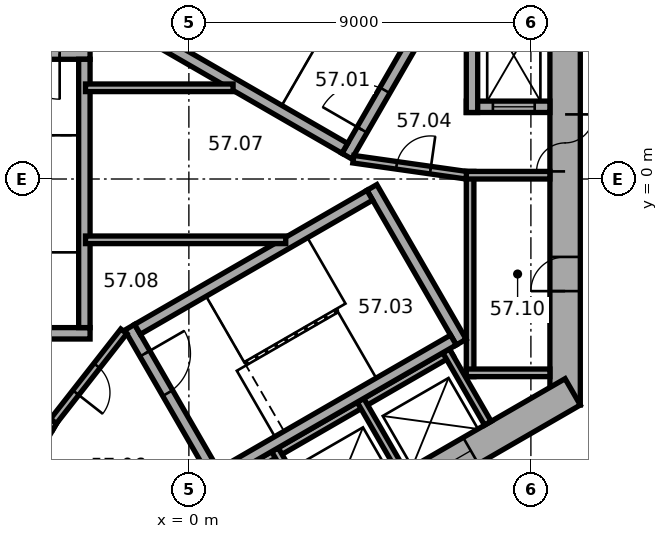
"""IFC4 building model, lengths in metres.
Left out: names, types, materials, properties, quantities, classifications, styles, units other than length and angle.
Written with IfcOpenShell. Run it as: python <this file> out.ifc"""

import sys

from ifc_helpers import new_model, si_unit, direction, frame, frame_2d, origin, place, context, subcontext, project, spatial, rectangle, extrude, element, fill, save


model = new_model("IFC4")
c1 = context("Model", 3, precision=1e-05, world=origin(), true_north=direction((0.0, 1.0)))
c2 = subcontext(c1, "Body", "Model", "MODEL_VIEW")
j1 = project(units=[si_unit("LENGTHUNIT", "METRE"), si_unit("PLANEANGLEUNIT", "RADIAN")], contexts=[c1])
p1 = place(None, origin())
s1 = spatial("IfcSite", under=j1, at=p1, CompositionType="ELEMENT")
p2 = place(p1, origin())
s2 = spatial("IfcBuilding", under=s1, at=p2, CompositionType="ELEMENT")
p3 = place(p2, frame((0.0, 0.0, 232.8)))
s3 = spatial("IfcBuildingStorey", under=s2, at=p3, CompositionType="ELEMENT", Elevation=232.8)
p4 = place(p3, frame((9.9, -5.947, 0.0), z_axis=(0.0, 0.0, 1.0), x_axis=(0.0, 1.0, 0.0)))
e1 = element("IfcWall", 1, at=p4, inside=s3, PredefinedType="SHEAR", context=c2, shape_type="SweptSolid", body=[
    extrude(rectangle(XDim=11.894, YDim=0.8, at=frame_2d((5.947, 0.0))), origin(), (0.0, 0.0, 1.0), 3.7),
])
p5 = place(p4, frame((6.147, 0.0, 0.0)))
e2 = element("IfcOpeningElement", 2, at=p5, cuts=e1, PredefinedType="OPENING", context=c2, shape_type="SweptSolid", body=[
    extrude(rectangle(XDim=1.5, YDim=2.1, at=frame_2d((0.75, 1.05))), frame((0.0, 0.41, 0.0), z_axis=(0.0, -1.0, 0.0), x_axis=(1.0, 0.0, 0.0)), (0.0, 0.0, 1.0), 0.82),
])
p6 = place(p4, frame((2.997, 0.0, 0.0)))
e3 = element("IfcOpeningElement", 3, at=p6, cuts=e1, PredefinedType="OPENING", context=c2, shape_type="SweptSolid", body=[
    extrude(rectangle(XDim=0.9, YDim=2.1, at=frame_2d((0.45, 1.05))), frame((0.0, 0.41, 0.0), z_axis=(0.0, -1.0, 0.0), x_axis=(1.0, 0.0, 0.0)), (0.0, 0.0, 1.0), 0.82),
])
p7 = place(p3, frame((-10.1, -5.6, 0.0), z_axis=(0.0, 0.0, 1.0), x_axis=(0.866023897231, -0.500002609418, 0.0)))
e4 = element("IfcWall", 4, at=p7, inside=s3, PredefinedType="SHEAR", context=c2, shape_type="SweptSolid", body=[
    extrude(rectangle(XDim=11.894, YDim=0.8, at=frame_2d((5.947, 0.0))), origin(), (0.0, 0.0, 1.0), 3.7),
])
p8 = place(p7, frame((6.147, 0.0, 0.0)))
e5 = element("IfcOpeningElement", 5, at=p8, cuts=e4, PredefinedType="OPENING", context=c2, shape_type="SweptSolid", body=[
    extrude(rectangle(XDim=1.5, YDim=2.1, at=frame_2d((0.75, 1.05))), frame((0.0, 0.41, 0.0), z_axis=(0.0, -1.0, 0.0), x_axis=(1.0, 0.0, 0.0)), (0.0, 0.0, 1.0), 0.82),
])
p9 = place(p7, frame((1.597, 0.0, 0.0)))
e6 = element("IfcOpeningElement", 6, at=p9, cuts=e4, PredefinedType="OPENING", context=c2, shape_type="SweptSolid", body=[
    extrude(rectangle(XDim=1.1, YDim=2.1, at=frame_2d((0.55, 1.05))), frame((0.0, 0.41, 0.0), z_axis=(0.0, -1.0, 0.0), x_axis=(1.0, 0.0, 0.0)), (0.0, 0.0, 1.0), 0.82),
])
p10 = place(p7, frame((4.197, 0.0, 0.0)))
e7 = element("IfcOpeningElement", 7, at=p10, cuts=e4, PredefinedType="OPENING", context=c2, shape_type="SweptSolid", body=[
    extrude(rectangle(XDim=1.1, YDim=2.1, at=frame_2d((0.55, 1.05))), frame((0.0, 0.41, 0.0), z_axis=(0.0, -1.0, 0.0), x_axis=(1.0, 0.0, 0.0)), (0.0, 0.0, 1.0), 0.82),
])
p11 = place(p3, frame((-0.2, -11.547, 0.0), z_axis=(0.0, 0.0, 1.0), x_axis=(0.866023897231, 0.500002609418, 0.0)))
e8 = element("IfcWall", 8, at=p11, inside=s3, PredefinedType="SHEAR", context=c2, shape_type="SweptSolid", body=[
    extrude(rectangle(XDim=11.894, YDim=0.8, at=frame_2d((5.947, 0.0))), origin(), (0.0, 0.0, 1.0), 3.7),
])
p12 = place(p11, frame((2.497, 0.0, 0.0)))
e9 = element("IfcOpeningElement", 9, at=p12, cuts=e8, PredefinedType="OPENING", context=c2, shape_type="SweptSolid", body=[
    extrude(rectangle(XDim=1.1, YDim=2.1, at=frame_2d((0.55, 1.05))), frame((0.0, 0.41, 0.0), z_axis=(0.0, -1.0, 0.0), x_axis=(1.0, 0.0, 0.0)), (0.0, 0.0, 1.0), 0.82),
])
p13 = place(p11, frame((5.097, 0.0, 0.0)))
e10 = element("IfcOpeningElement", 10, at=p13, cuts=e8, PredefinedType="OPENING", context=c2, shape_type="SweptSolid", body=[
    extrude(rectangle(XDim=1.1, YDim=2.1, at=frame_2d((0.55, 1.05))), frame((0.0, 0.41, 0.0), z_axis=(0.0, -1.0, 0.0), x_axis=(1.0, 0.0, 0.0)), (0.0, 0.0, 1.0), 0.82),
])
p14 = place(p11, frame((7.697, 0.0, 0.0)))
e11 = element("IfcOpeningElement", 11, at=p14, cuts=e8, PredefinedType="OPENING", context=c2, shape_type="SweptSolid", body=[
    extrude(rectangle(XDim=1.1, YDim=2.1, at=frame_2d((0.55, 1.05))), frame((0.0, 0.41, 0.0), z_axis=(0.0, -1.0, 0.0), x_axis=(1.0, 0.0, 0.0)), (0.0, 0.0, 1.0), 0.82),
])
p15 = place(p3, frame((7.4, -5.2, 0.0), z_axis=(0.0, 0.0, 1.0), x_axis=(0.0, 1.0, 0.0)))
e12 = element("IfcWall", 12, at=p15, inside=s3, PredefinedType="PARTITIONING", context=c2, shape_type="SweptSolid", body=[
    extrude(rectangle(XDim=5.4, YDim=0.2, at=frame_2d((2.7, 0.0))), origin(), (0.0, 0.0, 1.0), 3.42),
])
for number, where, z_axis, x_axis in (
    (13, (7.3, -5.1, 0.0), (0.0, 0.0, 1.0), (1.0, 0.0, 0.0)),
    (14, (7.3, 0.1, 0.0), (0.0, 0.0, 1.0), (1.0, 0.0, 0.0)),
):
    element("IfcWall", number, at=place(p3, frame(where, z_axis=z_axis, x_axis=x_axis)), inside=s3, PredefinedType="PARTITIONING", context=c2, shape_type="SweptSolid", body=[
        extrude(rectangle(XDim=2.2, YDim=0.2, at=frame_2d((1.1, 0.0))), origin(), (0.0, 0.0, 1.0), 3.42),
    ])
p16 = place(p3, frame((-8.203, -3.809, 0.0), z_axis=(0.0, 0.0, 1.0), x_axis=(0.866028230842, -0.499995103361, 0.0)))
e15 = element("IfcWall", 15, at=p16, inside=s3, PredefinedType="PARTITIONING", context=c2, shape_type="SweptSolid", body=[
    extrude(rectangle(XDim=5.4, YDim=0.2, at=frame_2d((2.7, 0.0))), origin(), (0.0, 0.0, 1.0), 3.42),
])
p17 = place(p3, frame((-3.563, -6.372, 0.0), z_axis=(0.0, 0.0, 1.0), x_axis=(-0.499994660107, -0.866028486751, 0.0)))
e16 = element("IfcWall", 16, at=p17, inside=s3, PredefinedType="PARTITIONING", context=c2, shape_type="SweptSolid", body=[
    extrude(rectangle(XDim=2.2, YDim=0.2, at=frame_2d((1.1, 0.0))), origin(), (0.0, 0.0, 1.0), 3.42),
])
p18 = place(p3, frame((-0.024, -8.559, 0.0), z_axis=(0.0, 0.0, 1.0), x_axis=(0.866026010844, 0.49999894854, 0.0)))
e17 = element("IfcWall", 17, at=p18, inside=s3, PredefinedType="PARTITIONING", context=c2, shape_type="SweptSolid", body=[
    extrude(rectangle(XDim=8.0, YDim=0.2, at=frame_2d((4.0, 0.0))), origin(), (0.0, 0.0, 1.0), 3.42),
])
for number, where, z_axis, x_axis in (
    (18, (2.264, -7.122, 0.0), (0.0, 0.0, 1.0), (0.5, -0.866, 0.0)),
    (19, (4.516, -5.822, 0.0), (0.0, 0.0, 1.0), (0.5, -0.866, 0.0)),
    (20, (6.768, -4.522, 0.0), (0.0, 0.0, 1.0), (0.5, -0.866, 0.0)),
):
    element("IfcWall", number, at=place(p3, frame(where, z_axis=z_axis, x_axis=x_axis)), inside=s3, PredefinedType="PARTITIONING", context=c2, shape_type="SweptSolid", body=[
        extrude(rectangle(XDim=2.2, YDim=0.2, at=frame_2d((1.1, 0.0))), origin(), (0.0, 0.0, 1.0), 3.42),
    ])
p19 = place(p3, frame((4.158, 0.602, 0.0), z_axis=(0.0, 0.0, 1.0), x_axis=(0.499977259774, 0.866038532462, 0.0)))
e21 = element("IfcWall", 21, at=p19, inside=s3, PredefinedType="SHEAR", context=c2, shape_type="SweptSolid", body=[
    extrude(rectangle(XDim=4.7, YDim=0.3, at=frame_2d((2.35, 0.0))), origin(), (0.0, 0.0, 1.0), 3.42),
])
p20 = place(p19, frame((0.8, 0.0, 0.0)))
e22 = element("IfcOpeningElement", 22, at=p20, cuts=e21, PredefinedType="OPENING", context=c2, shape_type="SweptSolid", body=[
    extrude(rectangle(XDim=1.2, YDim=2.1, at=frame_2d((0.6, 1.05))), frame((0.0, 0.16, 0.0), z_axis=(0.0, -1.0, 0.0), x_axis=(1.0, 0.0, 0.0)), (0.0, 0.0, 1.0), 0.32),
])
p21 = place(p3, frame((4.103, 0.807, 0.0), z_axis=(0.0, 0.0, 1.0), x_axis=(-0.866027801685, 0.499995846692, 0.0)))
e23 = element("IfcWall", 23, at=p21, inside=s3, PredefinedType="SHEAR", context=c2, shape_type="SweptSolid", body=[
    extrude(rectangle(XDim=7.06, YDim=0.3, at=frame_2d((3.53, 0.0))), origin(), (0.0, 0.0, 1.0), 3.42),
])
p22 = place(p3, frame((-2.6, 3.3, 0.0), z_axis=(0.0, 0.0, 1.0), x_axis=(-1.0, 0.0, 0.0)))
e24 = element("IfcWall", 24, at=p22, inside=s3, PredefinedType="SHEAR", context=c2, shape_type="SweptSolid", body=[
    extrude(rectangle(XDim=4.7, YDim=0.3, at=frame_2d((2.35, 0.0))), origin(), (0.0, 0.0, 1.0), 3.42),
])
p23 = place(p22, frame((0.8, 0.0, 0.0)))
e25 = element("IfcOpeningElement", 25, at=p23, cuts=e24, PredefinedType="OPENING", context=c2, shape_type="SweptSolid", body=[
    extrude(rectangle(XDim=1.2, YDim=2.1, at=frame_2d((0.6, 1.05))), frame((0.0, 0.16, 0.0), z_axis=(0.0, -1.0, 0.0), x_axis=(1.0, 0.0, 0.0)), (0.0, 0.0, 1.0), 0.32),
])
p24 = place(p3, frame((-2.6, -4.06, 0.0), z_axis=(0.0, 0.0, 1.0), x_axis=(-1.0, 0.0, 0.0)))
e26 = element("IfcWall", 26, at=p24, inside=s3, PredefinedType="SHEAR", context=c2, shape_type="SweptSolid", body=[
    extrude(rectangle(XDim=4.7, YDim=0.3, at=frame_2d((2.35, 0.0))), origin(), (0.0, 0.0, 1.0), 3.42),
])
p25 = place(p3, frame((-2.75, 3.15, 0.0), z_axis=(0.0, 0.0, 1.0), x_axis=(0.0, -1.0, 0.0)))
e27 = element("IfcWall", 27, at=p25, inside=s3, PredefinedType="SHEAR", context=c2, shape_type="SweptSolid", body=[
    extrude(rectangle(XDim=7.06, YDim=0.3, at=frame_2d((3.53, 0.0))), origin(), (0.0, 0.0, 1.0), 3.42),
])
p26 = place(p3, frame((-1.558, -3.902, 0.0), z_axis=(0.0, 0.0, 1.0), x_axis=(0.499977259774, -0.866038532462, 0.0)))
e28 = element("IfcWall", 28, at=p26, inside=s3, PredefinedType="SHEAR", context=c2, shape_type="SweptSolid", body=[
    extrude(rectangle(XDim=4.7, YDim=0.3, at=frame_2d((2.35, 0.0))), origin(), (0.0, 0.0, 1.0), 3.42),
])
p27 = place(p26, frame((0.8, 0.0, 0.0)))
e29 = element("IfcOpeningElement", 29, at=p27, cuts=e28, PredefinedType="OPENING", context=c2, shape_type="SweptSolid", body=[
    extrude(rectangle(XDim=1.2, YDim=2.1, at=frame_2d((0.6, 1.05))), frame((0.0, 0.16, 0.0), z_axis=(0.0, -1.0, 0.0), x_axis=(1.0, 0.0, 0.0)), (0.0, 0.0, 1.0), 0.32),
])
p28 = place(p3, frame((4.816, -0.222, 0.0), z_axis=(0.0, 0.0, 1.0), x_axis=(0.499977259774, -0.866038532462, 0.0)))
e30 = element("IfcWall", 30, at=p28, inside=s3, PredefinedType="SHEAR", context=c2, shape_type="SweptSolid", body=[
    extrude(rectangle(XDim=4.7, YDim=0.3, at=frame_2d((2.35, 0.0))), origin(), (0.0, 0.0, 1.0), 3.42),
])
for number, where, z_axis, x_axis in (
    (31, (-1.353, -3.957, 0.0), (0.0, 0.0, 1.0), (0.866, 0.5, 0.0)),
    (32, (0.847, -7.767, 0.0), (0.0, 0.0, 1.0), (0.866, 0.5, 0.0)),
):
    element("IfcWall", number, at=place(p3, frame(where, z_axis=z_axis, x_axis=x_axis)), inside=s3, PredefinedType="SHEAR", context=c2, shape_type="SweptSolid", body=[
        extrude(rectangle(XDim=7.06, YDim=0.3, at=frame_2d((3.53, 0.0))), origin(), (0.0, 0.0, 1.0), 3.42),
    ])
p29 = place(p3, frame((7.3, 1.9, 0.0), z_axis=(0.0, 0.0, 1.0), x_axis=(1.0, 0.0, 0.0)))
e33 = element("IfcWall", 33, at=p29, inside=s3, PredefinedType="SHEAR", context=c2, shape_type="SweptSolid", body=[
    extrude(rectangle(XDim=2.2, YDim=0.3, at=frame_2d((1.1, 0.0))), origin(), (0.0, 0.0, 1.0), 3.42),
])
p30 = place(p29, frame((0.7, 0.0, 0.0)))
e34 = element("IfcOpeningElement", 34, at=p30, cuts=e33, PredefinedType="OPENING", context=c2, shape_type="SweptSolid", body=[
    extrude(rectangle(XDim=1.1, YDim=2.1, at=frame_2d((0.55, 1.05))), frame((0.0, 0.16, 0.0), z_axis=(0.0, -1.0, 0.0), x_axis=(1.0, 0.0, 0.0)), (0.0, 0.0, 1.0), 0.32),
])
p31 = place(p3, frame((7.45, 1.75, 0.0), z_axis=(0.0, 0.0, 1.0), x_axis=(0.0, 1.0, 0.0)))
e35 = element("IfcWall", 35, at=p31, inside=s3, PredefinedType="SHEAR", context=c2, shape_type="SweptSolid", body=[
    extrude(rectangle(XDim=3.35, YDim=0.3, at=frame_2d((1.675, 0.0))), origin(), (0.0, 0.0, 1.0), 3.42),
])
p32 = place(p3, frame((4.327, 0.521, 0.0), z_axis=(0.0, 0.0, 1.0), x_axis=(0.990124376366, -0.14019172346, 0.0)))
e36 = element("IfcWall", 36, at=p32, inside=s3, PredefinedType="PARTITIONING", context=c2, shape_type="SweptSolid", body=[
    extrude(rectangle(XDim=3.002, YDim=0.2, at=frame_2d((1.501, 0.0))), origin(), (0.0, 0.0, 1.0), 3.42),
])
p33 = place(p32, frame((1.15, 0.0, 0.0)))
e37 = element("IfcOpeningElement", 37, at=p33, cuts=e36, PredefinedType="OPENING", context=c2, shape_type="SweptSolid", body=[
    extrude(rectangle(XDim=0.9, YDim=2.1, at=frame_2d((0.45, 1.05))), frame((0.0, 0.11, 0.0), z_axis=(0.0, -1.0, 0.0), x_axis=(1.0, 0.0, 0.0)), (0.0, 0.0, 1.0), 0.22),
])
p34 = place(p3, frame((-1.712, -4.008, 0.0), z_axis=(0.0, 0.0, 1.0), x_axis=(-0.616549420702, -0.787316208287, 0.0)))
e38 = element("IfcWall", 38, at=p34, inside=s3, PredefinedType="PARTITIONING", context=c2, shape_type="SweptSolid", body=[
    extrude(rectangle(XDim=3.002, YDim=0.2, at=frame_2d((1.501, 0.0))), origin(), (0.0, 0.0, 1.0), 3.42),
])
p35 = place(p34, frame((1.15, 0.0, 0.0)))
e39 = element("IfcOpeningElement", 39, at=p35, cuts=e38, PredefinedType="OPENING", context=c2, shape_type="SweptSolid", body=[
    extrude(rectangle(XDim=0.9, YDim=2.1, at=frame_2d((0.45, 1.05))), frame((0.0, 0.11, 0.0), z_axis=(0.0, -1.0, 0.0), x_axis=(1.0, 0.0, 0.0)), (0.0, 0.0, 1.0), 0.22),
])
p36 = place(p3, frame((-2.72, -1.6, 0.0), z_axis=(0.0, 0.0, 1.0), x_axis=(1.0, 0.0, 0.0)))
e40 = element("IfcWall", 40, at=p36, inside=s3, PredefinedType="PARTITIONING", context=c2, shape_type="SweptSolid", body=[
    extrude(rectangle(XDim=5.269, YDim=0.2, at=frame_2d((2.634, 0.0))), origin(), (0.0, 0.0, 1.0), 3.42),
])
p37 = place(p3, frame((-2.72, 2.4, 0.0), z_axis=(0.0, 0.0, 1.0), x_axis=(1.0, 0.0, 0.0)))
e41 = element("IfcWall", 41, at=p37, inside=s3, PredefinedType="PARTITIONING", context=c2, shape_type="SweptSolid", body=[
    extrude(rectangle(XDim=3.883, YDim=0.2, at=frame_2d((1.941, 0.0))), origin(), (0.0, 0.0, 1.0), 3.42),
])
p38 = place(p5, origin())
e42 = element("IfcDoor", 42, at=p38, inside=s3, OperationType="DOUBLE_DOOR_SINGLE_SWING", PredefinedType="DOOR", context=c2, shape_type="SweptSolid", body=[
    extrude(rectangle(XDim=1.5, YDim=2.1, at=frame_2d((0.75, 1.05))), frame((0.0, 0.025, 0.0), z_axis=(0.0, -1.0, 0.0), x_axis=(1.0, 0.0, 0.0)), (0.0, 0.0, 1.0), 0.05),
])
fill(e2, e42)
p39 = place(p20, origin())
e43 = element("IfcDoor", 43, at=p39, inside=s3, OperationType="SINGLE_SWING_RIGHT", PredefinedType="DOOR", context=c2, shape_type="SweptSolid", body=[
    extrude(rectangle(XDim=1.2, YDim=2.1, at=frame_2d((0.6, 1.05))), frame((0.0, 0.025, 0.0), z_axis=(0.0, -1.0, 0.0), x_axis=(1.0, 0.0, 0.0)), (0.0, 0.0, 1.0), 0.05),
])
fill(e22, e43)
p40 = place(p23, origin())
e44 = element("IfcDoor", 44, at=p40, inside=s3, OperationType="SINGLE_SWING_RIGHT", PredefinedType="DOOR", context=c2, shape_type="SweptSolid", body=[
    extrude(rectangle(XDim=1.2, YDim=2.1, at=frame_2d((0.6, 1.05))), frame((0.0, 0.025, 0.0), z_axis=(0.0, -1.0, 0.0), x_axis=(1.0, 0.0, 0.0)), (0.0, 0.0, 1.0), 0.05),
])
fill(e25, e44)
p41 = place(p27, origin())
e45 = element("IfcDoor", 45, at=p41, inside=s3, OperationType="SINGLE_SWING_RIGHT", PredefinedType="DOOR", context=c2, shape_type="SweptSolid", body=[
    extrude(rectangle(XDim=1.2, YDim=2.1, at=frame_2d((0.6, 1.05))), frame((0.0, 0.025, 0.0), z_axis=(0.0, -1.0, 0.0), x_axis=(1.0, 0.0, 0.0)), (0.0, 0.0, 1.0), 0.05),
])
fill(e29, e45)
p42 = place(p33, origin())
e46 = element("IfcDoor", 46, at=p42, inside=s3, OperationType="SINGLE_SWING_LEFT", PredefinedType="DOOR", context=c2, shape_type="SweptSolid", body=[
    extrude(rectangle(XDim=0.9, YDim=2.1, at=frame_2d((0.45, 1.05))), frame((0.0, 0.025, 0.0), z_axis=(0.0, -1.0, 0.0), x_axis=(1.0, 0.0, 0.0)), (0.0, 0.0, 1.0), 0.05),
])
fill(e37, e46)
p43 = place(p35, origin())
e47 = element("IfcDoor", 47, at=p43, inside=s3, OperationType="SINGLE_SWING_LEFT", PredefinedType="DOOR", context=c2, shape_type="SweptSolid", body=[
    extrude(rectangle(XDim=0.9, YDim=2.1, at=frame_2d((0.45, 1.05))), frame((0.0, 0.025, 0.0), z_axis=(0.0, -1.0, 0.0), x_axis=(1.0, 0.0, 0.0)), (0.0, 0.0, 1.0), 0.05),
])
fill(e39, e47)
p44 = place(p6, origin())
e48 = element("IfcDoor", 48, at=p44, inside=s3, OperationType="SINGLE_SWING_LEFT", PredefinedType="DOOR", context=c2, shape_type="SweptSolid", body=[
    extrude(rectangle(XDim=0.9, YDim=2.1, at=frame_2d((0.45, 1.05))), frame((0.0, 0.025, 0.0), z_axis=(0.0, -1.0, 0.0), x_axis=(1.0, 0.0, 0.0)), (0.0, 0.0, 1.0), 0.05),
])
fill(e3, e48)
p45 = place(p30, origin())
e49 = element("IfcDoor", 49, at=p45, inside=s3, OperationType="DOUBLE_DOOR_SLIDING", PredefinedType="DOOR", context=c2, shape_type="SweptSolid", body=[
    extrude(rectangle(XDim=1.1, YDim=2.1, at=frame_2d((0.55, 1.05))), frame((0.0, 0.025, 0.0), z_axis=(0.0, -1.0, 0.0), x_axis=(1.0, 0.0, 0.0)), (0.0, 0.0, 1.0), 0.05),
])
fill(e34, e49)
p46 = place(p14, origin())
e50 = element("IfcDoor", 50, at=p46, inside=s3, OperationType="DOUBLE_DOOR_SLIDING", PredefinedType="DOOR", context=c2, shape_type="SweptSolid", body=[
    extrude(rectangle(XDim=1.1, YDim=2.1, at=frame_2d((0.55, 1.05))), frame((0.0, 0.025, 0.0), z_axis=(0.0, -1.0, 0.0), x_axis=(1.0, 0.0, 0.0)), (0.0, 0.0, 1.0), 0.05),
])
fill(e11, e50)
save(model, sys.argv[1])
